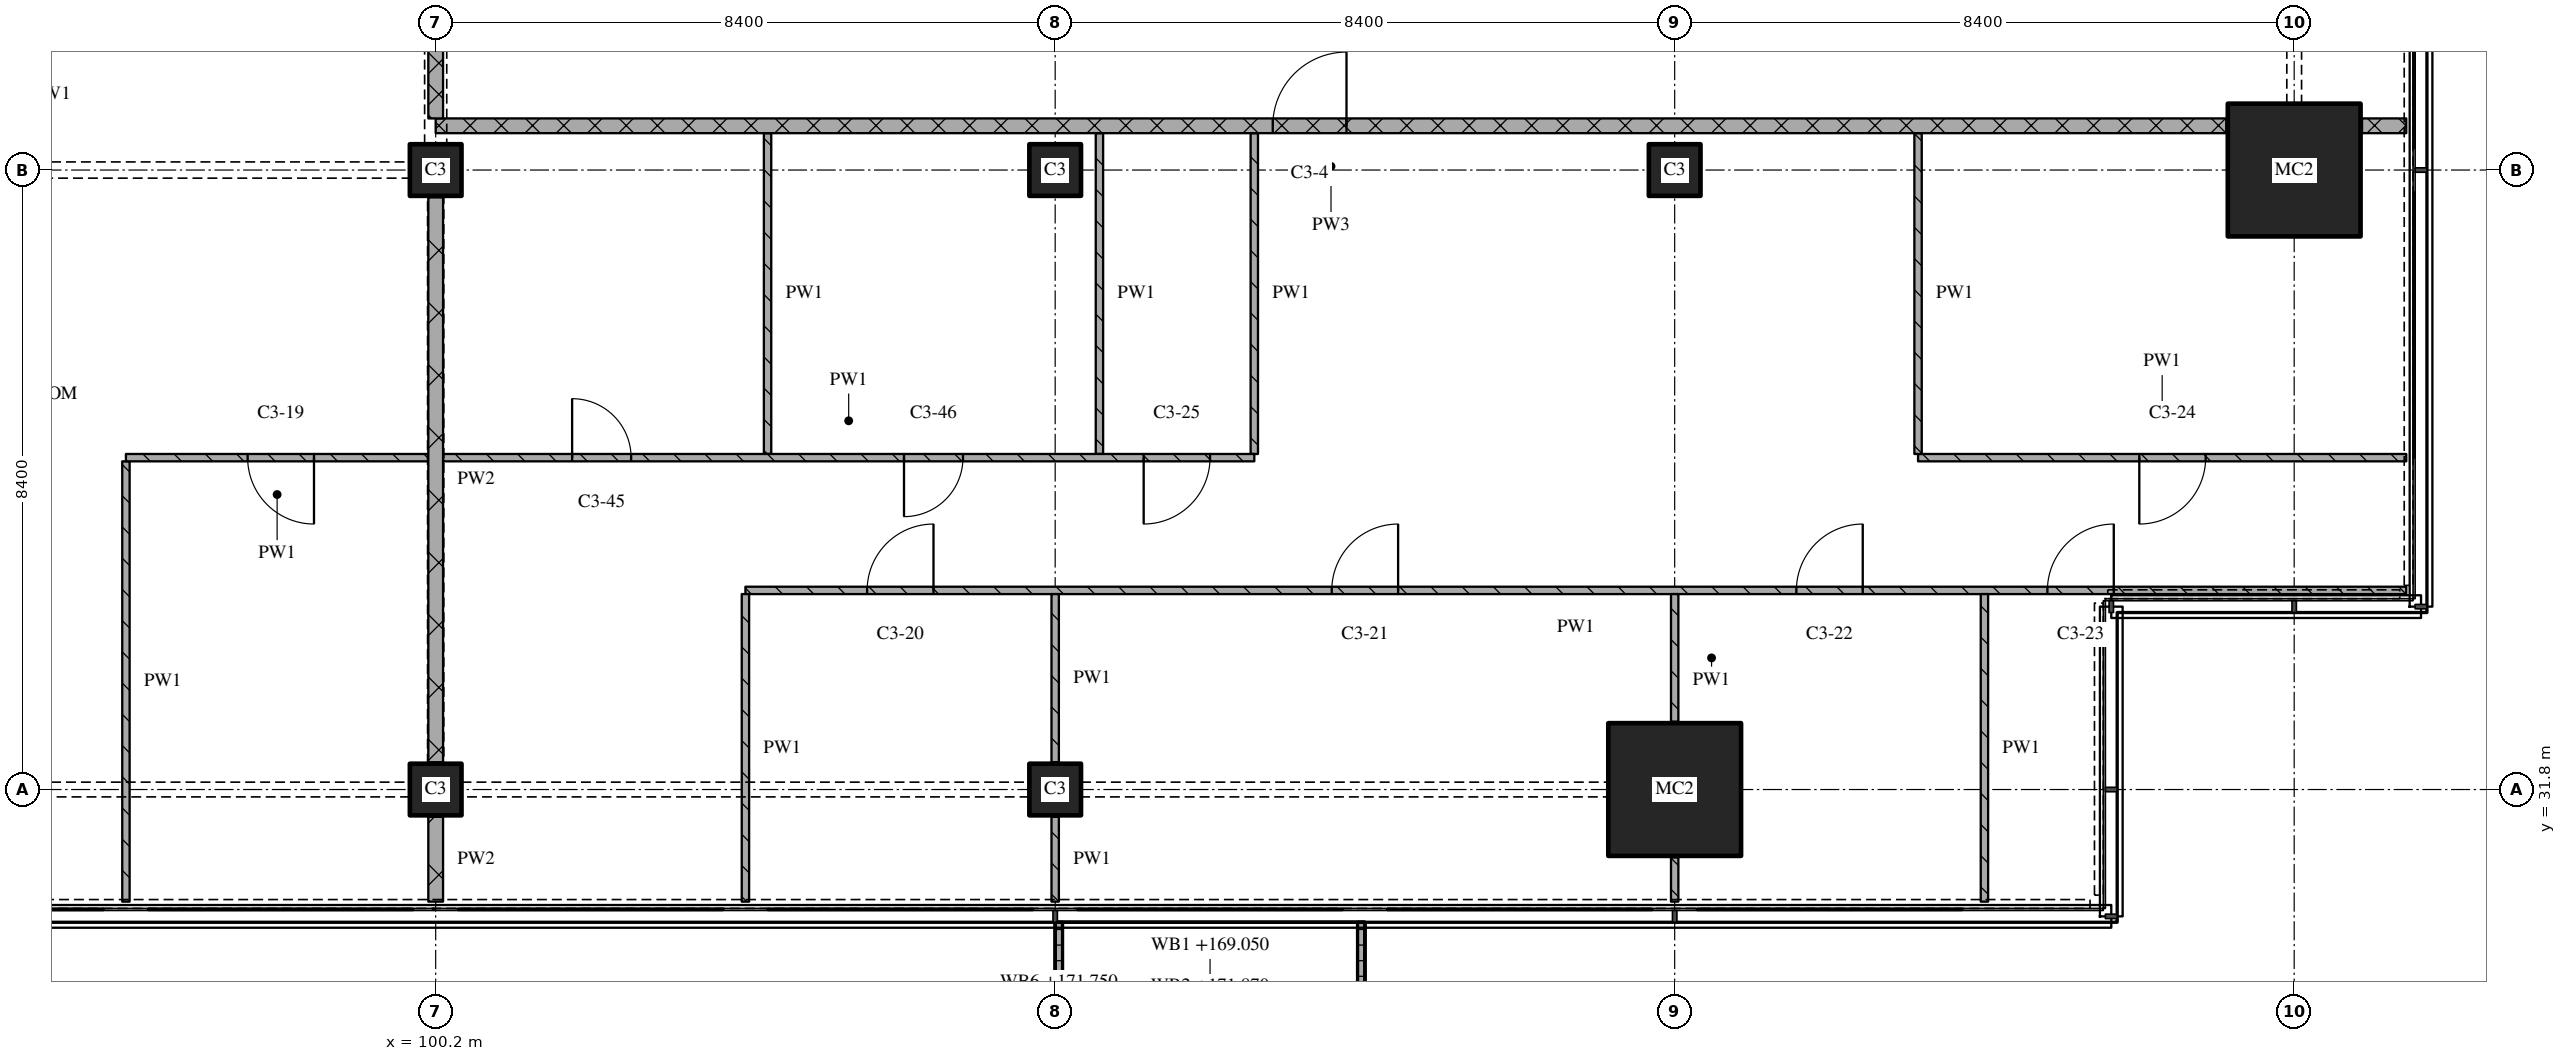
"""IFC4 building model, lengths in metres.
Left out: names, types, materials, properties, quantities, classifications, styles, units other than length and angle.
Written with IfcOpenShell. Run it as: python <this file> out.ifc"""

import sys

from ifc_helpers import new_model, si_unit, direction, frame, frame_2d, origin, origin_2d, place, context, subcontext, project, spatial, polyline, rectangle, outline, extrude, element, fill, save


model = new_model("IFC4")
c1 = context("Model", 3, precision=1e-05, world=origin(), true_north=direction((0.0, 1.0)))
c2 = subcontext(c1, "Body", "Model", "MODEL_VIEW")
j1 = project(units=[si_unit("LENGTHUNIT", "METRE"), si_unit("PLANEANGLEUNIT", "RADIAN")], contexts=[c1])
p1 = place(None, origin())
s1 = spatial("IfcSite", under=j1, at=p1, CompositionType="ELEMENT")
p2 = place(p1, origin())
s2 = spatial("IfcBuilding", under=s1, at=p2, CompositionType="ELEMENT")
p3 = place(p2, frame((0.0, 0.0, 169.05)))
s3 = spatial("IfcBuildingStorey", under=s2, at=p3, CompositionType="ELEMENT", Elevation=169.05)
for number, where, z_axis, x_axis in (
    (1, (100.2, 31.8, 0.0), (0.0, 0.0, 1.0), (1.0, 0.0, 0.0)),
    (2, (100.2, 40.2, 0.0), (0.0, 0.0, 1.0), (1.0, 0.0, 0.0)),
    (3, (108.6, 31.8, 0.0), (0.0, 0.0, 1.0), (1.0, 0.0, 0.0)),
    (4, (108.6, 40.2, 0.0), (0.0, 0.0, 1.0), (1.0, 0.0, 0.0)),
):
    element("IfcColumn", number, at=place(p3, frame(where, z_axis=z_axis, x_axis=x_axis)), inside=s3, PredefinedType="COLUMN", context=c2, shape_type="SweptSolid", body=[
        extrude(rectangle(XDim=0.7, YDim=0.7, at=origin_2d()), origin(), (0.0, 0.0, 1.0), 3.6),
    ])
p4 = place(p3, frame((117.0, 31.8, 0.0), z_axis=(0.0, 0.0, 1.0), x_axis=(1.0, 0.0, 0.0)))
e5 = element("IfcColumn", 5, at=p4, inside=s3, PredefinedType="COLUMN", context=c2, shape_type="SweptSolid", body=[
    extrude(rectangle(XDim=1.8, YDim=1.8, at=origin_2d()), origin(), (0.0, 0.0, 1.0), 3.6),
])
p5 = place(p3, frame((117.0, 40.2, 0.0), z_axis=(0.0, 0.0, 1.0), x_axis=(1.0, 0.0, 0.0)))
e6 = element("IfcColumn", 6, at=p5, inside=s3, PredefinedType="COLUMN", context=c2, shape_type="SweptSolid", body=[
    extrude(rectangle(XDim=0.7, YDim=0.7, at=origin_2d()), origin(), (0.0, 0.0, 1.0), 3.6),
])
p6 = place(p3, frame((125.4, 40.2, 0.0), z_axis=(0.0, 0.0, 1.0), x_axis=(1.0, 0.0, 0.0)))
e7 = element("IfcColumn", 7, at=p6, inside=s3, PredefinedType="COLUMN", context=c2, shape_type="SweptSolid", body=[
    extrude(rectangle(XDim=1.8, YDim=1.8, at=origin_2d()), origin(), (0.0, 0.0, 1.0), 3.6),
])
p7 = place(p3, origin())
e8 = element("IfcWall", 8, at=p7, inside=s3, PredefinedType="SOLIDWALL", context=c2, shape_type="SweptSolid", body=[
    extrude(outline(polyline([(108.6, 30.0), (108.7, 30.0), (108.7, 28.367), (112.7, 28.367), (112.7, 30.0), (112.8, 30.0), (112.8, 28.267), (108.6, 28.267), (108.6, 30.0)])), origin(), (0.0, 0.0, 1.0), 1.0),
])
p8 = place(p3, frame((126.92, 34.5, 0.0), z_axis=(0.0, 0.0, 1.0), x_axis=(-1.0, 0.0, 0.0)))
e9 = element("IfcWall", 9, at=p8, inside=s3, PredefinedType="PARTITIONING", context=c2, shape_type="SweptSolid", body=[
    extrude(rectangle(XDim=22.52, YDim=0.1, at=frame_2d((11.26, 0.0))), origin(), (0.0, 0.0, 1.0), 3.32),
])
p9 = place(p8, frame((3.966, 0.0, 0.0)))
e10 = element("IfcOpeningElement", 10, at=p9, cuts=e9, PredefinedType="OPENING", context=c2, shape_type="SweptSolid", body=[
    extrude(rectangle(XDim=0.9, YDim=2.1, at=frame_2d((0.45, 1.05))), frame((0.0, 0.06, 0.0), z_axis=(0.0, -1.0, 0.0), x_axis=(1.0, 0.0, 0.0)), (0.0, 0.0, 1.0), 0.12),
])
p10 = place(p8, frame((7.37, 0.0, 0.0)))
e11 = element("IfcOpeningElement", 11, at=p10, cuts=e9, PredefinedType="OPENING", context=c2, shape_type="SweptSolid", body=[
    extrude(rectangle(XDim=0.9, YDim=2.1, at=frame_2d((0.45, 1.05))), frame((0.0, 0.06, 0.0), z_axis=(0.0, -1.0, 0.0), x_axis=(1.0, 0.0, 0.0)), (0.0, 0.0, 1.0), 0.12),
])
p11 = place(p8, frame((13.67, 0.0, 0.0)))
e12 = element("IfcOpeningElement", 12, at=p11, cuts=e9, PredefinedType="OPENING", context=c2, shape_type="SweptSolid", body=[
    extrude(rectangle(XDim=0.9, YDim=2.1, at=frame_2d((0.45, 1.05))), frame((0.0, 0.06, 0.0), z_axis=(0.0, -1.0, 0.0), x_axis=(1.0, 0.0, 0.0)), (0.0, 0.0, 1.0), 0.12),
])
p12 = place(p8, frame((19.97, 0.0, 0.0)))
e13 = element("IfcOpeningElement", 13, at=p12, cuts=e9, PredefinedType="OPENING", context=c2, shape_type="SweptSolid", body=[
    extrude(rectangle(XDim=0.9, YDim=2.1, at=frame_2d((0.45, 1.05))), frame((0.0, 0.06, 0.0), z_axis=(0.0, -1.0, 0.0), x_axis=(1.0, 0.0, 0.0)), (0.0, 0.0, 1.0), 0.12),
])
p13 = place(p3, frame((120.3, 36.3, 0.0), z_axis=(0.0, 0.0, 1.0), x_axis=(1.0, 0.0, 0.0)))
e14 = element("IfcWall", 14, at=p13, inside=s3, PredefinedType="PARTITIONING", context=c2, shape_type="SweptSolid", body=[
    extrude(rectangle(XDim=6.62, YDim=0.1, at=frame_2d((3.31, 0.0))), origin(), (0.0, 0.0, 1.0), 3.32),
])
p14 = place(p13, frame((3.0, 0.0, 0.0)))
e15 = element("IfcOpeningElement", 15, at=p14, cuts=e14, PredefinedType="OPENING", context=c2, shape_type="SweptSolid", body=[
    extrude(rectangle(XDim=0.9, YDim=2.1, at=frame_2d((0.45, 1.05))), frame((0.0, 0.06, 0.0), z_axis=(0.0, -1.0, 0.0), x_axis=(1.0, 0.0, 0.0)), (0.0, 0.0, 1.0), 0.12),
])
p15 = place(p3, frame((124.48, 40.8, 0.0), z_axis=(0.0, 0.0, 1.0), x_axis=(-1.0, 0.0, 0.0)))
e16 = element("IfcWall", 16, at=p15, inside=s3, PredefinedType="PARTITIONING", context=c2, shape_type="SweptSolid", body=[
    extrude(rectangle(XDim=24.28, YDim=0.2, at=frame_2d((12.14, 0.0))), origin(), (0.0, 0.0, 1.0), 3.32),
])
p16 = place(p15, frame((11.93, 0.0, 0.0)))
e17 = element("IfcOpeningElement", 17, at=p16, cuts=e16, PredefinedType="OPENING", context=c2, shape_type="SweptSolid", body=[
    extrude(rectangle(XDim=1.0, YDim=2.1, at=frame_2d((0.5, 1.05))), frame((0.0, 0.11, 0.0), z_axis=(0.0, -1.0, 0.0), x_axis=(1.0, 0.0, 0.0)), (0.0, 0.0, 1.0), 0.22),
])
p17 = place(p3, frame((126.32, 40.8, 0.0), z_axis=(0.0, 0.0, 1.0), x_axis=(1.0, 0.0, 0.0)))
e18 = element("IfcWall", 18, at=p17, inside=s3, PredefinedType="PARTITIONING", context=c2, shape_type="SweptSolid", body=[
    extrude(rectangle(XDim=0.6, YDim=0.2, at=frame_2d((0.3, 0.0))), origin(), (0.0, 0.0, 1.0), 3.32),
])
p18 = place(p3, frame((96.0, 36.25, 0.0), z_axis=(0.0, 0.0, 1.0), x_axis=(0.0, -1.0, 0.0)))
e19 = element("IfcWall", 19, at=p18, inside=s3, PredefinedType="PARTITIONING", context=c2, shape_type="SweptSolid", body=[
    extrude(rectangle(XDim=5.97, YDim=0.1, at=frame_2d((2.985, 0.0))), origin(), (0.0, 0.0, 1.0), 3.32),
])
p19 = place(p3, frame((100.2, 43.1, 0.0), z_axis=(0.0, 0.0, 1.0), x_axis=(0.0, -1.0, 0.0)))
e20 = element("IfcWall", 20, at=p19, inside=s3, PredefinedType="PARTITIONING", context=c2, shape_type="SweptSolid", body=[
    extrude(rectangle(XDim=2.2, YDim=0.2, at=frame_2d((1.1, 0.0))), origin(), (0.0, 0.0, 1.0), 2.43),
])
p20 = place(p3, frame((100.2, 31.43, 0.0), z_axis=(0.0, 0.0, 1.0), x_axis=(0.0, -1.0, 0.0)))
e21 = element("IfcWall", 21, at=p20, inside=s3, PredefinedType="PARTITIONING", context=c2, shape_type="SweptSolid", body=[
    extrude(rectangle(XDim=1.15, YDim=0.2, at=frame_2d((0.575, 0.0))), origin(), (0.0, 0.0, 1.0), 3.32),
])
p21 = place(p3, frame((100.2, 39.83, 0.0), z_axis=(0.0, 0.0, 1.0), x_axis=(0.0, -1.0, 0.0)))
e22 = element("IfcWall", 22, at=p21, inside=s3, PredefinedType="PARTITIONING", context=c2, shape_type="SweptSolid", body=[
    extrude(rectangle(XDim=7.66, YDim=0.2, at=frame_2d((3.83, 0.0))), origin(), (0.0, 0.0, 1.0), 2.72),
])
p22 = place(p3, frame((104.4, 34.45, 0.0), z_axis=(0.0, 0.0, 1.0), x_axis=(0.0, -1.0, 0.0)))
e23 = element("IfcWall", 23, at=p22, inside=s3, PredefinedType="PARTITIONING", context=c2, shape_type="SweptSolid", body=[
    extrude(rectangle(XDim=4.17, YDim=0.1, at=frame_2d((2.085, 0.0))), origin(), (0.0, 0.0, 1.0), 3.32),
])
p23 = place(p3, frame((104.7, 40.7, 0.0), z_axis=(0.0, 0.0, 1.0), x_axis=(0.0, -1.0, 0.0)))
e24 = element("IfcWall", 24, at=p23, inside=s3, PredefinedType="PARTITIONING", context=c2, shape_type="SweptSolid", body=[
    extrude(rectangle(XDim=4.35, YDim=0.1, at=frame_2d((2.175, 0.0))), origin(), (0.0, 0.0, 1.0), 3.32),
])
p24 = place(p3, frame((108.6, 31.43, 0.0), z_axis=(0.0, 0.0, 1.0), x_axis=(0.0, -1.0, 0.0)))
e25 = element("IfcWall", 25, at=p24, inside=s3, PredefinedType="PARTITIONING", context=c2, shape_type="SweptSolid", body=[
    extrude(rectangle(XDim=1.15, YDim=0.1, at=frame_2d((0.575, 0.0))), origin(), (0.0, 0.0, 1.0), 3.32),
])
p25 = place(p3, frame((108.6, 34.45, 0.0), z_axis=(0.0, 0.0, 1.0), x_axis=(0.0, -1.0, 0.0)))
e26 = element("IfcWall", 26, at=p25, inside=s3, PredefinedType="PARTITIONING", context=c2, shape_type="SweptSolid", body=[
    extrude(rectangle(XDim=2.28, YDim=0.1, at=frame_2d((1.14, 0.0))), origin(), (0.0, 0.0, 1.0), 3.32),
])
for number, where, z_axis, x_axis in (
    (27, (109.2, 40.7, 0.0), (0.0, 0.0, 1.0), (0.0, -1.0, 0.0)),
    (28, (111.3, 40.7, 0.0), (0.0, 0.0, 1.0), (0.0, -1.0, 0.0)),
):
    element("IfcWall", number, at=place(p3, frame(where, z_axis=z_axis, x_axis=x_axis)), inside=s3, PredefinedType="PARTITIONING", context=c2, shape_type="SweptSolid", body=[
        extrude(rectangle(XDim=4.35, YDim=0.1, at=frame_2d((2.175, 0.0))), origin(), (0.0, 0.0, 1.0), 3.32),
    ])
p26 = place(p3, frame((117.0, 30.88, 0.0), z_axis=(0.0, 0.0, 1.0), x_axis=(0.0, -1.0, 0.0)))
e29 = element("IfcWall", 29, at=p26, inside=s3, PredefinedType="PARTITIONING", context=c2, shape_type="SweptSolid", body=[
    extrude(rectangle(XDim=0.6, YDim=0.1, at=frame_2d((0.3, 0.0))), origin(), (0.0, 0.0, 1.0), 3.32),
])
p27 = place(p3, frame((117.0, 34.45, 0.0), z_axis=(0.0, 0.0, 1.0), x_axis=(0.0, -1.0, 0.0)))
e30 = element("IfcWall", 30, at=p27, inside=s3, PredefinedType="PARTITIONING", context=c2, shape_type="SweptSolid", body=[
    extrude(rectangle(XDim=1.73, YDim=0.1, at=frame_2d((0.865, 0.0))), origin(), (0.0, 0.0, 1.0), 3.32),
])
p28 = place(p3, frame((120.3, 40.7, 0.0), z_axis=(0.0, 0.0, 1.0), x_axis=(0.0, -1.0, 0.0)))
e31 = element("IfcWall", 31, at=p28, inside=s3, PredefinedType="PARTITIONING", context=c2, shape_type="SweptSolid", body=[
    extrude(rectangle(XDim=4.35, YDim=0.1, at=frame_2d((2.175, 0.0))), origin(), (0.0, 0.0, 1.0), 3.32),
])
p29 = place(p3, frame((121.2, 34.45, 0.0), z_axis=(0.0, 0.0, 1.0), x_axis=(0.0, -1.0, 0.0)))
e32 = element("IfcWall", 32, at=p29, inside=s3, PredefinedType="PARTITIONING", context=c2, shape_type="SweptSolid", body=[
    extrude(rectangle(XDim=4.17, YDim=0.1, at=frame_2d((2.085, 0.0))), origin(), (0.0, 0.0, 1.0), 3.32),
])
p30 = place(p3, frame((100.1, 36.3, 0.0), z_axis=(0.0, 0.0, 1.0), x_axis=(-1.0, 0.0, 0.0)))
e33 = element("IfcWall", 33, at=p30, inside=s3, PredefinedType="PARTITIONING", context=c2, shape_type="SweptSolid", body=[
    extrude(rectangle(XDim=4.1, YDim=0.1, at=frame_2d((2.05, 0.0))), origin(), (0.0, 0.0, 1.0), 3.32),
])
p31 = place(p30, frame((1.55, 0.0, 0.0)))
e34 = element("IfcOpeningElement", 34, at=p31, cuts=e33, PredefinedType="OPENING", context=c2, shape_type="SweptSolid", body=[
    extrude(rectangle(XDim=0.9, YDim=2.1, at=frame_2d((0.45, 1.05))), frame((0.0, 0.06, 0.0), z_axis=(0.0, -1.0, 0.0), x_axis=(1.0, 0.0, 0.0)), (0.0, 0.0, 1.0), 0.12),
])
p32 = place(p3, frame((100.3, 36.3, 0.0), z_axis=(0.0, 0.0, 1.0), x_axis=(1.0, 0.0, 0.0)))
e35 = element("IfcWall", 35, at=p32, inside=s3, PredefinedType="PARTITIONING", context=c2, shape_type="SweptSolid", body=[
    extrude(rectangle(XDim=11.0, YDim=0.1, at=frame_2d((5.5, 0.0))), origin(), (0.0, 0.0, 1.0), 3.32),
])
p33 = place(p32, frame((1.75, 0.0, 0.0)))
e36 = element("IfcOpeningElement", 36, at=p33, cuts=e35, PredefinedType="OPENING", context=c2, shape_type="SweptSolid", body=[
    extrude(rectangle(XDim=0.8, YDim=2.1, at=frame_2d((0.4, 1.05))), frame((0.0, 0.06, 0.0), z_axis=(0.0, -1.0, 0.0), x_axis=(1.0, 0.0, 0.0)), (0.0, 0.0, 1.0), 0.12),
])
p34 = place(p32, frame((6.25, 0.0, 0.0)))
e37 = element("IfcOpeningElement", 37, at=p34, cuts=e35, PredefinedType="OPENING", context=c2, shape_type="SweptSolid", body=[
    extrude(rectangle(XDim=0.8, YDim=2.1, at=frame_2d((0.4, 1.05))), frame((0.0, 0.06, 0.0), z_axis=(0.0, -1.0, 0.0), x_axis=(1.0, 0.0, 0.0)), (0.0, 0.0, 1.0), 0.12),
])
p35 = place(p32, frame((9.5, 0.0, 0.0)))
e38 = element("IfcOpeningElement", 38, at=p35, cuts=e35, PredefinedType="OPENING", context=c2, shape_type="SweptSolid", body=[
    extrude(rectangle(XDim=0.9, YDim=2.1, at=frame_2d((0.45, 1.05))), frame((0.0, 0.06, 0.0), z_axis=(0.0, -1.0, 0.0), x_axis=(1.0, 0.0, 0.0)), (0.0, 0.0, 1.0), 0.12),
])
p36 = place(p9, origin())
e39 = element("IfcDoor", 39, at=p36, inside=s3, OperationType="SINGLE_SWING_RIGHT", PredefinedType="DOOR", context=c2, shape_type="SweptSolid", body=[
    extrude(rectangle(XDim=0.9, YDim=2.1, at=frame_2d((0.45, 1.05))), frame((0.0, 0.025, 0.0), z_axis=(0.0, -1.0, 0.0), x_axis=(1.0, 0.0, 0.0)), (0.0, 0.0, 1.0), 0.05),
])
fill(e10, e39)
p37 = place(p10, origin())
e40 = element("IfcDoor", 40, at=p37, inside=s3, OperationType="SINGLE_SWING_RIGHT", PredefinedType="DOOR", context=c2, shape_type="SweptSolid", body=[
    extrude(rectangle(XDim=0.9, YDim=2.1, at=frame_2d((0.45, 1.05))), frame((0.0, 0.025, 0.0), z_axis=(0.0, -1.0, 0.0), x_axis=(1.0, 0.0, 0.0)), (0.0, 0.0, 1.0), 0.05),
])
fill(e11, e40)
p38 = place(p11, origin())
e41 = element("IfcDoor", 41, at=p38, inside=s3, OperationType="SINGLE_SWING_RIGHT", PredefinedType="DOOR", context=c2, shape_type="SweptSolid", body=[
    extrude(rectangle(XDim=0.9, YDim=2.1, at=frame_2d((0.45, 1.05))), frame((0.0, 0.025, 0.0), z_axis=(0.0, -1.0, 0.0), x_axis=(1.0, 0.0, 0.0)), (0.0, 0.0, 1.0), 0.05),
])
fill(e12, e41)
p39 = place(p12, origin())
e42 = element("IfcDoor", 42, at=p39, inside=s3, OperationType="SINGLE_SWING_RIGHT", PredefinedType="DOOR", context=c2, shape_type="SweptSolid", body=[
    extrude(rectangle(XDim=0.9, YDim=2.1, at=frame_2d((0.45, 1.05))), frame((0.0, 0.025, 0.0), z_axis=(0.0, -1.0, 0.0), x_axis=(1.0, 0.0, 0.0)), (0.0, 0.0, 1.0), 0.05),
])
fill(e13, e42)
p40 = place(p14, origin())
e43 = element("IfcDoor", 43, at=p40, inside=s3, OperationType="SINGLE_SWING_RIGHT", PredefinedType="DOOR", context=c2, shape_type="SweptSolid", body=[
    extrude(rectangle(XDim=0.9, YDim=2.1, at=frame_2d((0.45, 1.05))), frame((0.0, 0.025, 0.0), z_axis=(0.0, -1.0, 0.0), x_axis=(1.0, 0.0, 0.0)), (0.0, 0.0, 1.0), 0.05),
])
fill(e15, e43)
p41 = place(p16, origin())
e44 = element("IfcDoor", 44, at=p41, inside=s3, OperationType="SINGLE_SWING_RIGHT", PredefinedType="DOOR", context=c2, shape_type="SweptSolid", body=[
    extrude(rectangle(XDim=1.0, YDim=2.1, at=frame_2d((0.5, 1.05))), frame((0.0, 0.025, 0.0), z_axis=(0.0, -1.0, 0.0), x_axis=(1.0, 0.0, 0.0)), (0.0, 0.0, 1.0), 0.05),
])
fill(e17, e44)
p42 = place(p31, origin())
e45 = element("IfcDoor", 45, at=p42, inside=s3, OperationType="SINGLE_SWING_LEFT", PredefinedType="DOOR", context=c2, shape_type="SweptSolid", body=[
    extrude(rectangle(XDim=0.9, YDim=2.1, at=frame_2d((0.45, 1.05))), frame((0.0, 0.025, 0.0), z_axis=(0.0, -1.0, 0.0), x_axis=(1.0, 0.0, 0.0)), (0.0, 0.0, 1.0), 0.05),
])
fill(e34, e45)
p43 = place(p33, origin())
e46 = element("IfcDoor", 46, at=p43, inside=s3, OperationType="SINGLE_SWING_LEFT", PredefinedType="DOOR", context=c2, shape_type="SweptSolid", body=[
    extrude(rectangle(XDim=0.8, YDim=2.1, at=frame_2d((0.4, 1.05))), frame((0.0, 0.025, 0.0), z_axis=(0.0, -1.0, 0.0), x_axis=(1.0, 0.0, 0.0)), (0.0, 0.0, 1.0), 0.05),
])
fill(e36, e46)
p44 = place(p34, origin())
e47 = element("IfcDoor", 47, at=p44, inside=s3, OperationType="SINGLE_SWING_RIGHT", PredefinedType="DOOR", context=c2, shape_type="SweptSolid", body=[
    extrude(rectangle(XDim=0.8, YDim=2.1, at=frame_2d((0.4, 1.05))), frame((0.0, 0.025, 0.0), z_axis=(0.0, -1.0, 0.0), x_axis=(1.0, 0.0, 0.0)), (0.0, 0.0, 1.0), 0.05),
])
fill(e37, e47)
p45 = place(p35, origin())
e48 = element("IfcDoor", 48, at=p45, inside=s3, OperationType="SINGLE_SWING_RIGHT", PredefinedType="DOOR", context=c2, shape_type="SweptSolid", body=[
    extrude(rectangle(XDim=0.9, YDim=2.1, at=frame_2d((0.45, 1.05))), frame((0.0, 0.025, 0.0), z_axis=(0.0, -1.0, 0.0), x_axis=(1.0, 0.0, 0.0)), (0.0, 0.0, 1.0), 0.05),
])
fill(e38, e48)
save(model, sys.argv[1])
